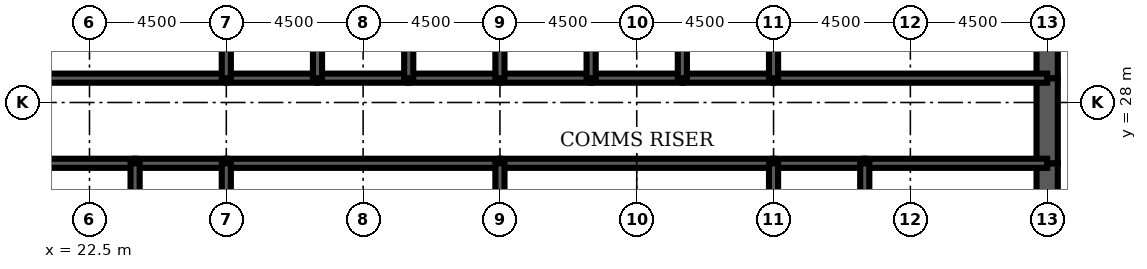
"""IFC4 building model, lengths in metres.
Left out: names, types, materials, properties, quantities, classifications, styles, units other than length and angle.
Written with IfcOpenShell. Run it as: python <this file> out.ifc"""

import sys

from ifc_helpers import new_model, si_unit, direction, frame, frame_2d, origin, place, context, subcontext, project, spatial, rectangle, extrude, element, fill, save


model = new_model("IFC4")
c1 = context("Model", 3, precision=1e-05, world=origin(), true_north=direction((0.0, 1.0)))
c2 = subcontext(c1, "Body", "Model", "MODEL_VIEW")
j1 = project(units=[si_unit("LENGTHUNIT", "METRE"), si_unit("PLANEANGLEUNIT", "RADIAN")], contexts=[c1])
p1 = place(None, origin())
s1 = spatial("IfcSite", under=j1, at=p1, CompositionType="ELEMENT")
p2 = place(p1, origin())
s2 = spatial("IfcBuilding", under=s1, at=p2, CompositionType="ELEMENT")
p3 = place(p2, frame((0.0, 0.0, 329.9)))
s3 = spatial("IfcBuildingStorey", under=s2, at=p3, CompositionType="ELEMENT", Elevation=329.9)
p4 = place(p3, frame((54.0, 22.0, 0.0), z_axis=(0.0, 0.0, 1.0), x_axis=(0.0, 1.0, 0.0)))
e1 = element("IfcWall", 1, at=p4, inside=s3, PredefinedType="SHEAR", context=c2, shape_type="SweptSolid", body=[
    extrude(rectangle(XDim=4.0, YDim=0.7, at=frame_2d((2.0, 0.0))), origin(), (0.0, 0.0, 1.0), 4.2),
])
p5 = place(p3, frame((54.0, 26.0, 0.0), z_axis=(0.0, 0.0, 1.0), x_axis=(0.0, 1.0, 0.0)))
e2 = element("IfcWall", 2, at=p5, inside=s3, PredefinedType="SHEAR", context=c2, shape_type="SweptSolid", body=[
    extrude(rectangle(XDim=2.8, YDim=0.7, at=frame_2d((1.4, 0.0))), origin(), (0.0, 0.0, 1.0), 4.2),
])
p6 = place(p5, frame((0.6, 0.0, 0.0)))
e3 = element("IfcOpeningElement", 3, at=p6, cuts=e2, PredefinedType="OPENING", context=c2, shape_type="SweptSolid", body=[
    extrude(rectangle(XDim=1.8, YDim=2.1, at=frame_2d((0.9, 1.05))), frame((0.0, 0.36, 0.0), z_axis=(0.0, -1.0, 0.0), x_axis=(1.0, 0.0, 0.0)), (0.0, 0.0, 1.0), 0.72),
])
p7 = place(p3, frame((54.0, 28.8, 0.0), z_axis=(0.0, 0.0, 1.0), x_axis=(0.0, 1.0, 0.0)))
e4 = element("IfcWall", 4, at=p7, inside=s3, PredefinedType="SHEAR", context=c2, shape_type="SweptSolid", body=[
    extrude(rectangle(XDim=3.2, YDim=0.7, at=frame_2d((1.6, 0.0))), origin(), (0.0, 0.0, 1.0), 4.2),
])
p8 = place(p3, frame((18.0, 28.8, 0.0), z_axis=(0.0, 0.0, 1.0), x_axis=(1.0, 0.0, 0.0)))
e5 = element("IfcWall", 5, at=p8, inside=s3, PredefinedType="SOLIDWALL", context=c2, shape_type="SweptSolid", body=[
    extrude(rectangle(XDim=9.0, YDim=0.3, at=frame_2d((4.5, 0.0))), origin(), (0.0, 0.0, 1.0), 4.2),
])
p9 = place(p8, frame((0.65, 0.0, 0.0)))
e6 = element("IfcOpeningElement", 6, at=p9, cuts=e5, PredefinedType="OPENING", context=c2, shape_type="SweptSolid", body=[
    extrude(rectangle(XDim=1.0, YDim=2.1, at=frame_2d((0.5, 1.05))), frame((0.0, 0.16, 0.0), z_axis=(0.0, -1.0, 0.0), x_axis=(1.0, 0.0, 0.0)), (0.0, 0.0, 1.0), 0.32),
])
p10 = place(p3, frame((27.0, 28.8, 0.0), z_axis=(0.0, 0.0, 1.0), x_axis=(1.0, 0.0, 0.0)))
e7 = element("IfcWall", 7, at=p10, inside=s3, PredefinedType="SOLIDWALL", context=c2, shape_type="SweptSolid", body=[
    extrude(rectangle(XDim=3.0, YDim=0.3, at=frame_2d((1.5, 0.0))), origin(), (0.0, 0.0, 1.0), 4.2),
])
p11 = place(p10, frame((0.95, 0.0, 0.0)))
e8 = element("IfcOpeningElement", 8, at=p11, cuts=e7, PredefinedType="OPENING", context=c2, shape_type="SweptSolid", body=[
    extrude(rectangle(XDim=1.1, YDim=2.2, at=frame_2d((0.55, 1.1))), frame((0.0, 0.16, 0.0), z_axis=(0.0, -1.0, 0.0), x_axis=(1.0, 0.0, 0.0)), (0.0, 0.0, 1.0), 0.32),
])
p12 = place(p3, frame((30.0, 28.8, 0.0), z_axis=(0.0, 0.0, 1.0), x_axis=(1.0, 0.0, 0.0)))
e9 = element("IfcWall", 9, at=p12, inside=s3, PredefinedType="SOLIDWALL", context=c2, shape_type="SweptSolid", body=[
    extrude(rectangle(XDim=3.0, YDim=0.3, at=frame_2d((1.5, 0.0))), origin(), (0.0, 0.0, 1.0), 4.2),
])
p13 = place(p12, frame((0.95, 0.0, 0.0)))
e10 = element("IfcOpeningElement", 10, at=p13, cuts=e9, PredefinedType="OPENING", context=c2, shape_type="SweptSolid", body=[
    extrude(rectangle(XDim=1.1, YDim=2.2, at=frame_2d((0.55, 1.1))), frame((0.0, 0.16, 0.0), z_axis=(0.0, -1.0, 0.0), x_axis=(1.0, 0.0, 0.0)), (0.0, 0.0, 1.0), 0.32),
])
p14 = place(p3, frame((33.0, 28.8, 0.0), z_axis=(0.0, 0.0, 1.0), x_axis=(1.0, 0.0, 0.0)))
e11 = element("IfcWall", 11, at=p14, inside=s3, PredefinedType="SOLIDWALL", context=c2, shape_type="SweptSolid", body=[
    extrude(rectangle(XDim=3.0, YDim=0.3, at=frame_2d((1.5, 0.0))), origin(), (0.0, 0.0, 1.0), 4.2),
])
p15 = place(p14, frame((0.95, 0.0, 0.0)))
e12 = element("IfcOpeningElement", 12, at=p15, cuts=e11, PredefinedType="OPENING", context=c2, shape_type="SweptSolid", body=[
    extrude(rectangle(XDim=1.1, YDim=2.2, at=frame_2d((0.55, 1.1))), frame((0.0, 0.16, 0.0), z_axis=(0.0, -1.0, 0.0), x_axis=(1.0, 0.0, 0.0)), (0.0, 0.0, 1.0), 0.32),
])
p16 = place(p3, frame((36.0, 28.8, 0.0), z_axis=(0.0, 0.0, 1.0), x_axis=(1.0, 0.0, 0.0)))
e13 = element("IfcWall", 13, at=p16, inside=s3, PredefinedType="SOLIDWALL", context=c2, shape_type="SweptSolid", body=[
    extrude(rectangle(XDim=3.0, YDim=0.3, at=frame_2d((1.5, 0.0))), origin(), (0.0, 0.0, 1.0), 4.2),
])
p17 = place(p16, frame((1.0, 0.0, 0.0)))
e14 = element("IfcOpeningElement", 14, at=p17, cuts=e13, PredefinedType="OPENING", context=c2, shape_type="SweptSolid", body=[
    extrude(rectangle(XDim=1.0, YDim=2.1, at=frame_2d((0.5, 1.05))), frame((0.0, 0.16, 0.0), z_axis=(0.0, -1.0, 0.0), x_axis=(1.0, 0.0, 0.0)), (0.0, 0.0, 1.0), 0.32),
])
p18 = place(p3, frame((39.0, 28.8, 0.0), z_axis=(0.0, 0.0, 1.0), x_axis=(1.0, 0.0, 0.0)))
e15 = element("IfcWall", 15, at=p18, inside=s3, PredefinedType="SOLIDWALL", context=c2, shape_type="SweptSolid", body=[
    extrude(rectangle(XDim=3.0, YDim=0.3, at=frame_2d((1.5, 0.0))), origin(), (0.0, 0.0, 1.0), 4.2),
])
p19 = place(p18, frame((1.0, 0.0, 0.0)))
e16 = element("IfcOpeningElement", 16, at=p19, cuts=e15, PredefinedType="OPENING", context=c2, shape_type="SweptSolid", body=[
    extrude(rectangle(XDim=1.0, YDim=2.1, at=frame_2d((0.5, 1.05))), frame((0.0, 0.16, 0.0), z_axis=(0.0, -1.0, 0.0), x_axis=(1.0, 0.0, 0.0)), (0.0, 0.0, 1.0), 0.32),
])
p20 = place(p3, frame((42.0, 28.8, 0.0), z_axis=(0.0, 0.0, 1.0), x_axis=(1.0, 0.0, 0.0)))
e17 = element("IfcWall", 17, at=p20, inside=s3, PredefinedType="SOLIDWALL", context=c2, shape_type="SweptSolid", body=[
    extrude(rectangle(XDim=3.0, YDim=0.3, at=frame_2d((1.5, 0.0))), origin(), (0.0, 0.0, 1.0), 4.2),
])
p21 = place(p20, frame((0.95, 0.0, 0.0)))
e18 = element("IfcOpeningElement", 18, at=p21, cuts=e17, PredefinedType="OPENING", context=c2, shape_type="SweptSolid", body=[
    extrude(rectangle(XDim=1.1, YDim=2.2, at=frame_2d((0.55, 1.1))), frame((0.0, 0.16, 0.0), z_axis=(0.0, -1.0, 0.0), x_axis=(1.0, 0.0, 0.0)), (0.0, 0.0, 1.0), 0.32),
])
p22 = place(p3, frame((45.0, 28.8, 0.0), z_axis=(0.0, 0.0, 1.0), x_axis=(1.0, 0.0, 0.0)))
e19 = element("IfcWall", 19, at=p22, inside=s3, PredefinedType="SOLIDWALL", context=c2, shape_type="SweptSolid", body=[
    extrude(rectangle(XDim=9.0, YDim=0.3, at=frame_2d((4.5, 0.0))), origin(), (0.0, 0.0, 1.0), 4.2),
])
p23 = place(p22, frame((7.35, 0.0, 0.0)))
e20 = element("IfcOpeningElement", 20, at=p23, cuts=e19, PredefinedType="OPENING", context=c2, shape_type="SweptSolid", body=[
    extrude(rectangle(XDim=1.0, YDim=2.1, at=frame_2d((0.5, 1.05))), frame((0.0, 0.16, 0.0), z_axis=(0.0, -1.0, 0.0), x_axis=(1.0, 0.0, 0.0)), (0.0, 0.0, 1.0), 0.32),
])
p24 = place(p3, frame((18.0, 26.0, 0.0), z_axis=(0.0, 0.0, 1.0), x_axis=(1.0, 0.0, 0.0)))
e21 = element("IfcWall", 21, at=p24, inside=s3, PredefinedType="SOLIDWALL", context=c2, shape_type="SweptSolid", body=[
    extrude(rectangle(XDim=6.0, YDim=0.3, at=frame_2d((3.0, 0.0))), origin(), (0.0, 0.0, 1.0), 4.2),
])
p25 = place(p3, frame((24.0, 26.0, 0.0), z_axis=(0.0, 0.0, 1.0), x_axis=(1.0, 0.0, 0.0)))
e22 = element("IfcWall", 22, at=p25, inside=s3, PredefinedType="SOLIDWALL", context=c2, shape_type="SweptSolid", body=[
    extrude(rectangle(XDim=3.0, YDim=0.3, at=frame_2d((1.5, 0.0))), origin(), (0.0, 0.0, 1.0), 4.2),
])
for number, where, z_axis, x_axis in (
    (23, (27.0, 26.0, 0.0), (0.0, 0.0, 1.0), (1.0, 0.0, 0.0)),
    (24, (36.0, 26.0, 0.0), (0.0, 0.0, 1.0), (1.0, 0.0, 0.0)),
):
    element("IfcWall", number, at=place(p3, frame(where, z_axis=z_axis, x_axis=x_axis)), inside=s3, PredefinedType="SOLIDWALL", context=c2, shape_type="SweptSolid", body=[
        extrude(rectangle(XDim=9.0, YDim=0.3, at=frame_2d((4.5, 0.0))), origin(), (0.0, 0.0, 1.0), 4.2),
    ])
p26 = place(p3, frame((45.0, 26.0, 0.0), z_axis=(0.0, 0.0, 1.0), x_axis=(1.0, 0.0, 0.0)))
e25 = element("IfcWall", 25, at=p26, inside=s3, PredefinedType="SOLIDWALL", context=c2, shape_type="SweptSolid", body=[
    extrude(rectangle(XDim=3.0, YDim=0.3, at=frame_2d((1.5, 0.0))), origin(), (0.0, 0.0, 1.0), 4.2),
])
p27 = place(p3, frame((48.0, 26.0, 0.0), z_axis=(0.0, 0.0, 1.0), x_axis=(1.0, 0.0, 0.0)))
e26 = element("IfcWall", 26, at=p27, inside=s3, PredefinedType="SOLIDWALL", context=c2, shape_type="SweptSolid", body=[
    extrude(rectangle(XDim=6.0, YDim=0.3, at=frame_2d((3.0, 0.0))), origin(), (0.0, 0.0, 1.0), 4.2),
])
for number, where, z_axis, x_axis in (
    (27, (27.0, 28.8, 0.0), (0.0, 0.0, 1.0), (0.0, 1.0, 0.0)),
    (28, (30.0, 28.8, 0.0), (0.0, 0.0, 1.0), (0.0, 1.0, 0.0)),
    (29, (33.0, 28.8, 0.0), (0.0, 0.0, 1.0), (0.0, 1.0, 0.0)),
    (30, (36.0, 28.8, 0.0), (0.0, 0.0, 1.0), (0.0, 1.0, 0.0)),
    (31, (39.0, 28.8, 0.0), (0.0, 0.0, 1.0), (0.0, 1.0, 0.0)),
    (32, (42.0, 28.8, 0.0), (0.0, 0.0, 1.0), (0.0, 1.0, 0.0)),
    (33, (45.0, 28.8, 0.0), (0.0, 0.0, 1.0), (0.0, 1.0, 0.0)),
):
    element("IfcWall", number, at=place(p3, frame(where, z_axis=z_axis, x_axis=x_axis)), inside=s3, PredefinedType="SOLIDWALL", context=c2, shape_type="SweptSolid", body=[
        extrude(rectangle(XDim=3.2, YDim=0.3, at=frame_2d((1.6, 0.0))), origin(), (0.0, 0.0, 1.0), 4.2),
    ])
for number, where, z_axis, x_axis in (
    (34, (24.0, 22.0, 0.0), (0.0, 0.0, 1.0), (0.0, 1.0, 0.0)),
    (35, (27.0, 22.0, 0.0), (0.0, 0.0, 1.0), (0.0, 1.0, 0.0)),
    (36, (36.0, 22.0, 0.0), (0.0, 0.0, 1.0), (0.0, 1.0, 0.0)),
    (37, (45.0, 22.0, 0.0), (0.0, 0.0, 1.0), (0.0, 1.0, 0.0)),
    (38, (48.0, 22.0, 0.0), (0.0, 0.0, 1.0), (0.0, 1.0, 0.0)),
):
    element("IfcWall", number, at=place(p3, frame(where, z_axis=z_axis, x_axis=x_axis)), inside=s3, PredefinedType="SOLIDWALL", context=c2, shape_type="SweptSolid", body=[
        extrude(rectangle(XDim=4.0, YDim=0.3, at=frame_2d((2.0, 0.0))), origin(), (0.0, 0.0, 1.0), 4.2),
    ])
p28 = place(p3, frame((42.5, 22.15, 0.0), z_axis=(0.0, 0.0, 1.0), x_axis=(0.0, 1.0, 0.0)))
e39 = element("IfcWall", 39, at=p28, inside=s3, PredefinedType="PARTITIONING", context=c2, shape_type="SweptSolid", body=[
    extrude(rectangle(XDim=3.7, YDim=0.15, at=frame_2d((1.85, 0.0))), origin(), (0.0, 0.0, 1.0), 3.0),
])
p29 = place(p28, frame((2.2, 0.0, 0.0)))
e40 = element("IfcOpeningElement", 40, at=p29, cuts=e39, PredefinedType="OPENING", context=c2, shape_type="SweptSolid", body=[
    extrude(rectangle(XDim=1.0, YDim=2.1, at=frame_2d((0.5, 1.05))), frame((0.0, 0.085, 0.0), z_axis=(0.0, -1.0, 0.0), x_axis=(1.0, 0.0, 0.0)), (0.0, 0.0, 1.0), 0.17),
])
p30 = place(p3, frame((52.075, 22.15, 0.0), z_axis=(0.0, 0.0, 1.0), x_axis=(0.0, 1.0, 0.0)))
e41 = element("IfcWall", 41, at=p30, inside=s3, PredefinedType="PARTITIONING", context=c2, shape_type="SweptSolid", body=[
    extrude(rectangle(XDim=3.7, YDim=0.15, at=frame_2d((1.85, 0.0))), origin(), (0.0, 0.0, 1.0), 3.0),
])
p31 = place(p3, frame((22.2, 26.15, 0.0), z_axis=(0.0, 0.0, 1.0), x_axis=(0.0, 1.0, 0.0)))
e42 = element("IfcWall", 42, at=p31, inside=s3, PredefinedType="PARTITIONING", context=c2, shape_type="SweptSolid", body=[
    extrude(rectangle(XDim=2.5, YDim=0.15, at=frame_2d((1.25, 0.0))), origin(), (0.0, 0.0, 1.0), 3.0),
])
p32 = place(p31, frame((0.35, 0.0, 0.0)))
e43 = element("IfcOpeningElement", 43, at=p32, cuts=e42, PredefinedType="OPENING", context=c2, shape_type="SweptSolid", body=[
    extrude(rectangle(XDim=1.0, YDim=2.1, at=frame_2d((0.5, 1.05))), frame((0.0, 0.085, 0.0), z_axis=(0.0, -1.0, 0.0), x_axis=(1.0, 0.0, 0.0)), (0.0, 0.0, 1.0), 0.17),
])
p33 = place(p29, origin())
e44 = element("IfcDoor", 44, at=p33, inside=s3, OperationType="SINGLE_SWING_RIGHT", PredefinedType="DOOR", context=c2, shape_type="SweptSolid", body=[
    extrude(rectangle(XDim=1.0, YDim=2.1, at=frame_2d((0.5, 1.05))), frame((0.0, 0.025, 0.0), z_axis=(0.0, -1.0, 0.0), x_axis=(1.0, 0.0, 0.0)), (0.0, 0.0, 1.0), 0.05),
])
fill(e40, e44)
p34 = place(p32, origin())
e45 = element("IfcDoor", 45, at=p34, inside=s3, OperationType="SINGLE_SWING_LEFT", PredefinedType="DOOR", context=c2, shape_type="SweptSolid", body=[
    extrude(rectangle(XDim=1.0, YDim=2.1, at=frame_2d((0.5, 1.05))), frame((0.0, 0.025, 0.0), z_axis=(0.0, -1.0, 0.0), x_axis=(1.0, 0.0, 0.0)), (0.0, 0.0, 1.0), 0.05),
])
fill(e43, e45)
p35 = place(p21, origin())
e46 = element("IfcDoor", 46, at=p35, inside=s3, OperationType="DOUBLE_DOOR_SLIDING", PredefinedType="USERDEFINED", context=c2, shape_type="SweptSolid", body=[
    extrude(rectangle(XDim=1.1, YDim=2.2, at=frame_2d((0.55, 1.1))), frame((0.0, 0.025, 0.0), z_axis=(0.0, -1.0, 0.0), x_axis=(1.0, 0.0, 0.0)), (0.0, 0.0, 1.0), 0.05),
])
fill(e18, e46)
p36 = place(p11, origin())
e47 = element("IfcDoor", 47, at=p36, inside=s3, OperationType="DOUBLE_DOOR_SLIDING", PredefinedType="USERDEFINED", context=c2, shape_type="SweptSolid", body=[
    extrude(rectangle(XDim=1.1, YDim=2.2, at=frame_2d((0.55, 1.1))), frame((0.0, 0.025, 0.0), z_axis=(0.0, -1.0, 0.0), x_axis=(1.0, 0.0, 0.0)), (0.0, 0.0, 1.0), 0.05),
])
fill(e8, e47)
p37 = place(p13, origin())
e48 = element("IfcDoor", 48, at=p37, inside=s3, OperationType="DOUBLE_DOOR_SLIDING", PredefinedType="USERDEFINED", context=c2, shape_type="SweptSolid", body=[
    extrude(rectangle(XDim=1.1, YDim=2.2, at=frame_2d((0.55, 1.1))), frame((0.0, 0.025, 0.0), z_axis=(0.0, -1.0, 0.0), x_axis=(1.0, 0.0, 0.0)), (0.0, 0.0, 1.0), 0.05),
])
fill(e10, e48)
p38 = place(p15, origin())
e49 = element("IfcDoor", 49, at=p38, inside=s3, OperationType="DOUBLE_DOOR_SLIDING", PredefinedType="USERDEFINED", context=c2, shape_type="SweptSolid", body=[
    extrude(rectangle(XDim=1.1, YDim=2.2, at=frame_2d((0.55, 1.1))), frame((0.0, 0.025, 0.0), z_axis=(0.0, -1.0, 0.0), x_axis=(1.0, 0.0, 0.0)), (0.0, 0.0, 1.0), 0.05),
])
fill(e12, e49)
p39 = place(p23, origin())
e50 = element("IfcDoor", 50, at=p39, inside=s3, OperationType="SINGLE_SWING_RIGHT", PredefinedType="DOOR", context=c2, shape_type="SweptSolid", body=[
    extrude(rectangle(XDim=1.0, YDim=2.1, at=frame_2d((0.5, 1.05))), frame((0.0, 0.025, 0.0), z_axis=(0.0, -1.0, 0.0), x_axis=(1.0, 0.0, 0.0)), (0.0, 0.0, 1.0), 0.05),
])
fill(e20, e50)
p40 = place(p6, origin())
e51 = element("IfcDoor", 51, at=p40, inside=s3, OperationType="SINGLE_SWING_LEFT", PredefinedType="DOOR", context=c2, shape_type="SweptSolid", body=[
    extrude(rectangle(XDim=1.8, YDim=2.1, at=frame_2d((0.9, 1.05))), frame((0.0, 0.35, 0.0), z_axis=(0.0, -1.0, 0.0), x_axis=(1.0, 0.0, 0.0)), (0.0, 0.0, 1.0), 0.699),
])
fill(e3, e51)
p41 = place(p17, origin())
e52 = element("IfcDoor", 52, at=p41, inside=s3, OperationType="SINGLE_SWING_LEFT", PredefinedType="DOOR", context=c2, shape_type="SweptSolid", body=[
    extrude(rectangle(XDim=1.0, YDim=2.1, at=frame_2d((0.5, 1.05))), frame((0.0, 0.025, 0.0), z_axis=(0.0, -1.0, 0.0), x_axis=(1.0, 0.0, 0.0)), (0.0, 0.0, 1.0), 0.05),
])
fill(e14, e52)
p42 = place(p19, origin())
e53 = element("IfcDoor", 53, at=p42, inside=s3, OperationType="SINGLE_SWING_LEFT", PredefinedType="DOOR", context=c2, shape_type="SweptSolid", body=[
    extrude(rectangle(XDim=1.0, YDim=2.1, at=frame_2d((0.5, 1.05))), frame((0.0, 0.025, 0.0), z_axis=(0.0, -1.0, 0.0), x_axis=(1.0, 0.0, 0.0)), (0.0, 0.0, 1.0), 0.05),
])
fill(e16, e53)
save(model, sys.argv[1])
